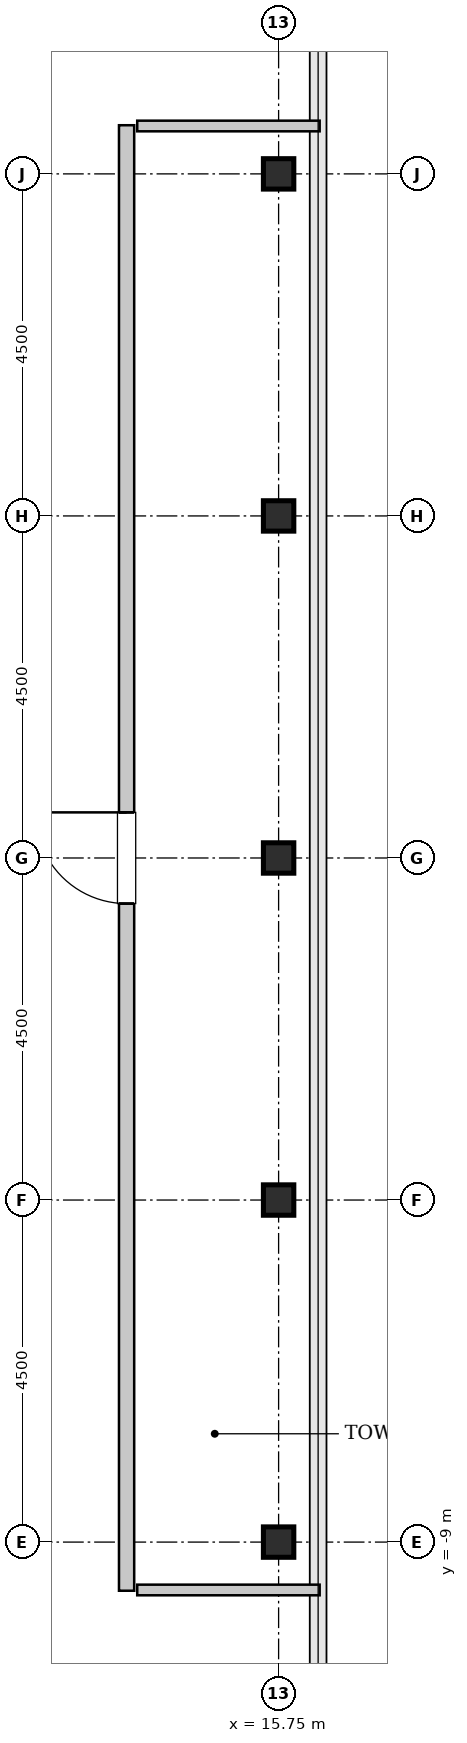
"""IFC4 building model, lengths in metres.
Left out: names, types, materials, properties, quantities, classifications, styles, units other than length and angle.
Written with IfcOpenShell. Run it as: python <this file> out.ifc"""

import sys

from ifc_helpers import new_model, si_unit, direction, frame, frame_2d, origin, origin_2d, place, context, subcontext, project, spatial, rectangle, hollow_rectangle, extrude, source, transform, mapped, element, fill, save


model = new_model("IFC4")
c1 = context("Model", 3, precision=1e-05, world=origin(), true_north=direction((0.0, 1.0)))
c2 = subcontext(c1, "Body", "Model", "MODEL_VIEW")
j1 = project(units=[si_unit("LENGTHUNIT", "METRE"), si_unit("PLANEANGLEUNIT", "RADIAN")], contexts=[c1])
p1 = place(None, origin())
s1 = spatial("IfcSite", under=j1, at=p1, CompositionType="ELEMENT")
p2 = place(p1, origin())
s2 = spatial("IfcBuilding", under=s1, at=p2, CompositionType="ELEMENT")
p3 = place(p2, frame((0.0, 0.0, 363.0)))
s3 = spatial("IfcBuildingStorey", under=s2, at=p3, CompositionType="ELEMENT", Elevation=363.0)
m1 = source(origin(), c2, "Body", "SweptSolid", [
    extrude(hollow_rectangle(XDim=0.4, YDim=0.4, WallThickness=0.02, InnerFilletRadius=0.02, OuterFilletRadius=0.04, at=origin_2d()), origin(), (0.0, 0.0, 1.0), 4.4),
])
for number, where, z_axis, x_axis in (
    (1, (15.75, -9.0, 0.0), (0.0, 0.0, 1.0), (1.0, 0.0, 0.0)),
    (2, (15.75, -4.5, 0.0), (0.0, 0.0, 1.0), (1.0, 0.0, 0.0)),
    (3, (15.75, 0.0, 0.0), (0.0, 0.0, 1.0), (1.0, 0.0, 0.0)),
    (4, (15.75, 4.5, 0.0), (0.0, 0.0, 1.0), (1.0, 0.0, 0.0)),
    (5, (15.75, 9.0, 0.0), (0.0, 0.0, 1.0), (1.0, 0.0, 0.0)),
):
    element("IfcColumn", number, at=place(p3, frame(where, z_axis=z_axis, x_axis=x_axis)), inside=s3, PredefinedType="COLUMN", context=c2, shape_type="MappedRepresentation", body=[
        mapped(m1, transform((0.0, 0.0, 0.0), x_axis=(1.0, 0.0, 0.0), y_axis=(0.0, 1.0, 0.0), z_axis=(0.0, 0.0, 1.0), scale=1.0)),
    ])
m2 = source(origin(), c2, "Body", "SweptSolid", [
    extrude(rectangle(XDim=19.28, YDim=0.2, at=frame_2d((9.64, 0.0))), origin(), (0.0, 0.0, 1.0), 4.085),
])
p4 = place(p3, frame((13.75, -9.64, 0.0), z_axis=(0.0, 0.0, 1.0), x_axis=(0.0, 1.0, 0.0)))
e6 = element("IfcWall", 6, at=p4, inside=s3, PredefinedType="SOLIDWALL", context=c2, shape_type="MappedRepresentation", body=[
    mapped(m2, transform((0.0, 0.0, 0.0), x_axis=(1.0, 0.0, 0.0), y_axis=(0.0, 1.0, 0.0), z_axis=(0.0, 0.0, 1.0), scale=1.0)),
])
p5 = place(p4, frame((9.04, 0.0, 0.0)))
e7 = element("IfcOpeningElement", 7, at=p5, cuts=e6, PredefinedType="OPENING", context=c2, shape_type="SweptSolid", body=[
    extrude(rectangle(XDim=1.2, YDim=2.15, at=frame_2d((0.6, 1.075))), frame((0.0, 0.11, 0.0), z_axis=(0.0, -1.0, 0.0), x_axis=(1.0, 0.0, 0.0)), (0.0, 0.0, 1.0), 0.22),
])
m3 = source(origin(), c2, "Body", "SweptSolid", [
    extrude(rectangle(XDim=2.4, YDim=0.14, at=frame_2d((1.2, 0.0))), origin(), (0.0, 0.0, 1.0), 4.085),
])
for number, where, z_axis, x_axis in (
    (8, (13.89, 9.63, 0.0), (0.0, 0.0, 1.0), (1.0, 0.0, 0.0)),
    (9, (13.89, -9.63, 0.0), (0.0, 0.0, 1.0), (1.0, 0.0, 0.0)),
):
    element("IfcWall", number, at=place(p3, frame(where, z_axis=z_axis, x_axis=x_axis)), inside=s3, PredefinedType="PARTITIONING", context=c2, shape_type="MappedRepresentation", body=[
        mapped(m3, transform((0.0, 0.0, 0.0), x_axis=(1.0, 0.0, 0.0), y_axis=(0.0, 1.0, 0.0), z_axis=(0.0, 0.0, 1.0), scale=1.0)),
    ])
m4 = source(origin(), c2, "Body", "SweptSolid", [
    extrude(rectangle(XDim=1.2, YDim=2.15, at=frame_2d((0.6, 1.075))), frame((0.0, 0.025, 0.0), z_axis=(0.0, -1.0, 0.0), x_axis=(1.0, 0.0, 0.0)), (0.0, 0.0, 1.0), 0.05),
])
p6 = place(p5, origin())
e10 = element("IfcDoor", 10, at=p6, inside=s3, OperationType="SINGLE_SWING_RIGHT", PredefinedType="DOOR", context=c2, shape_type="MappedRepresentation", body=[
    mapped(m4, transform((0.0, 0.0, 0.0), x_axis=(1.0, 0.0, 0.0), y_axis=(0.0, 1.0, 0.0), z_axis=(0.0, 0.0, 1.0), scale=1.0)),
])
fill(e7, e10)
save(model, sys.argv[1])
